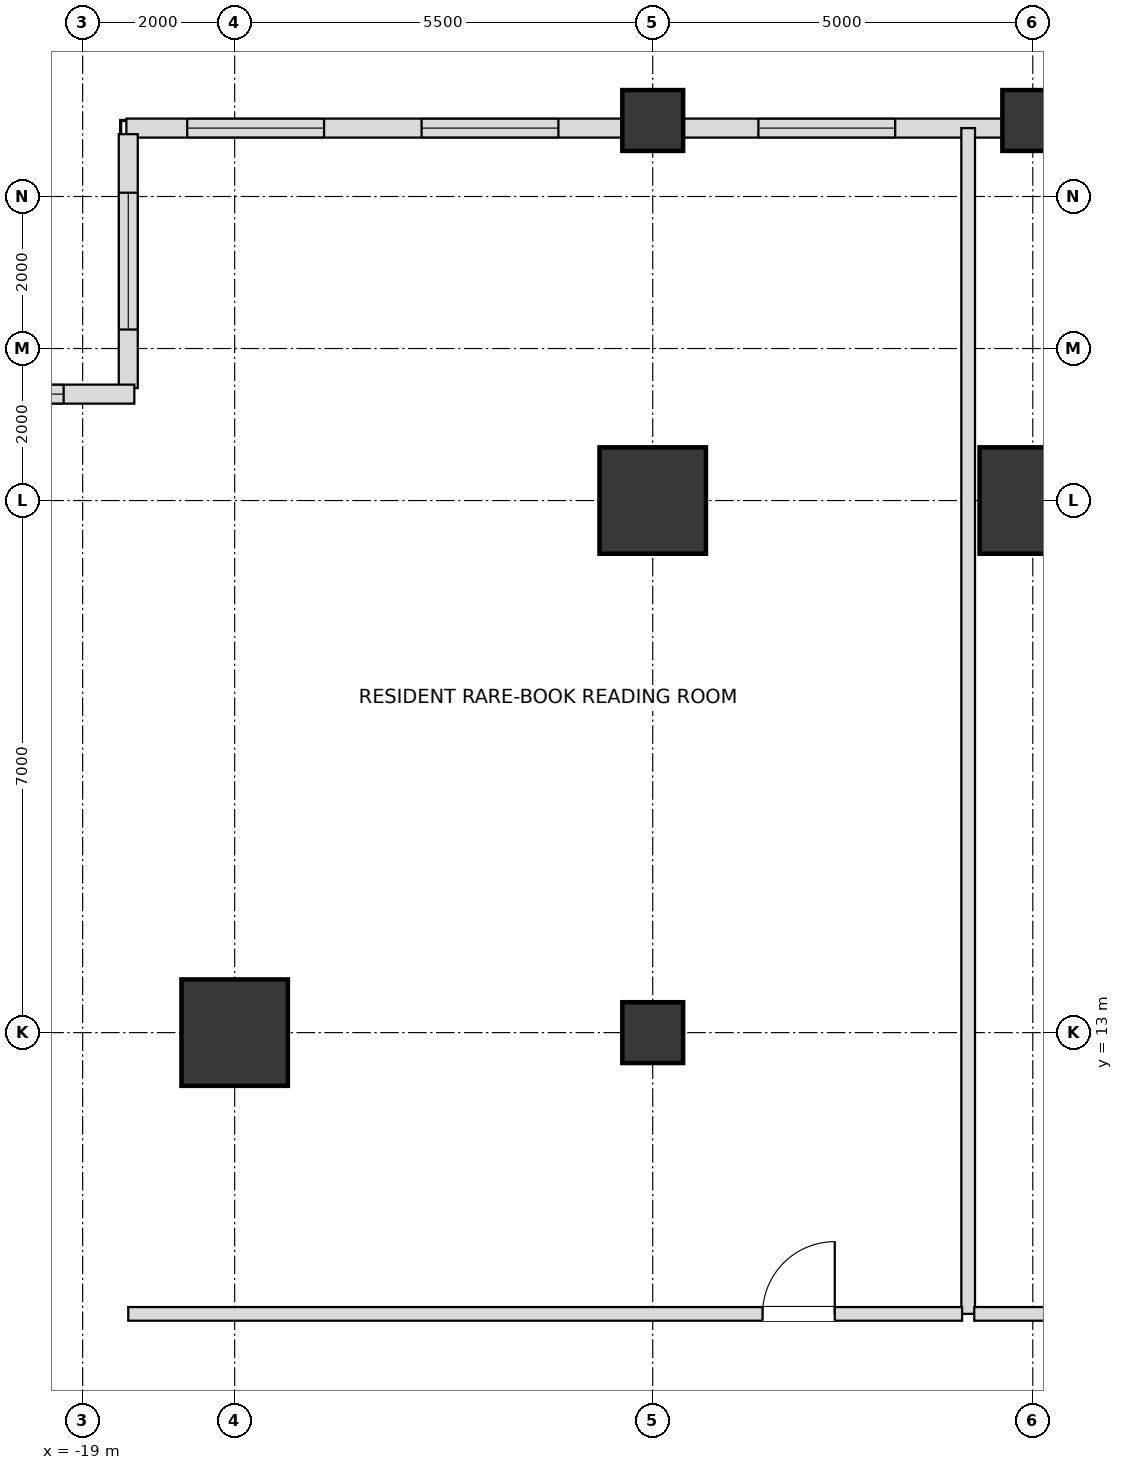
"""IFC4 building model, lengths in metres.
Left out: names, types, materials, properties, quantities, classifications, styles, units other than length and angle.
Written with IfcOpenShell. Run it as: python <this file> out.ifc"""

import sys

from ifc_helpers import new_model, si_unit, direction, frame, frame_2d, origin, origin_2d, place, context, subcontext, project, spatial, rectangle, extrude, element, fill, save


model = new_model("IFC4")
c1 = context("Model", 3, precision=1e-05, world=origin(), true_north=direction((0.0, 1.0)))
c2 = subcontext(c1, "Body", "Model", "MODEL_VIEW")
j1 = project(units=[si_unit("LENGTHUNIT", "METRE"), si_unit("PLANEANGLEUNIT", "RADIAN")], contexts=[c1])
p1 = place(None, origin())
s1 = spatial("IfcSite", under=j1, at=p1, CompositionType="ELEMENT")
p2 = place(p1, origin())
s2 = spatial("IfcBuilding", under=s1, at=p2, CompositionType="ELEMENT")
p3 = place(p2, frame((0.0, 0.0, 68.4)))
s3 = spatial("IfcBuildingStorey", under=s2, at=p3, CompositionType="ELEMENT", Elevation=68.4)
for number, where, z_axis, x_axis in (
    (1, (-6.5, 20.0, 0.0), (0.0, 0.0, 1.0), (1.0, 0.0, 0.0)),
    (2, (-11.5, 20.0, 0.0), (0.0, 0.0, 1.0), (1.0, 0.0, 0.0)),
    (3, (-17.0, 13.0, 0.0), (0.0, 0.0, 1.0), (1.0, 0.0, 0.0)),
):
    element("IfcColumn", number, at=place(p3, frame(where, z_axis=z_axis, x_axis=x_axis)), inside=s3, PredefinedType="USERDEFINED", context=c2, shape_type="SweptSolid", body=[
        extrude(rectangle(XDim=1.4, YDim=1.4, at=origin_2d()), origin(), (0.0, 0.0, 1.0), 3.6),
    ])
for number, where, z_axis, x_axis in (
    (4, (-11.5, 13.0, 0.0), (0.0, 0.0, 1.0), (1.0, 0.0, 0.0)),
    (5, (-11.5, 25.0, 0.0), (0.0, 0.0, 1.0), (1.0, 0.0, 0.0)),
    (6, (-6.5, 25.0, 0.0), (0.0, 0.0, 1.0), (1.0, 0.0, 0.0)),
):
    element("IfcColumn", number, at=place(p3, frame(where, z_axis=z_axis, x_axis=x_axis)), inside=s3, PredefinedType="COLUMN", context=c2, shape_type="SweptSolid", body=[
        extrude(rectangle(XDim=0.8, YDim=0.8, at=origin_2d()), origin(), (0.0, 0.0, 1.0), 3.6),
    ])
p4 = place(p3, frame((-6.895, 24.9, 0.0), z_axis=(0.0, 0.0, 1.0), x_axis=(-1.0, 0.0, 0.0)))
e7 = element("IfcWall", 7, at=p4, inside=s3, PredefinedType="SOLIDWALL", context=c2, shape_type="SweptSolid", body=[
    extrude(rectangle(XDim=4.21, YDim=0.25, at=frame_2d((2.105, 0.0))), origin(), (0.0, 0.0, 1.0), 2.736),
])
p5 = place(p4, frame((1.415, 0.0, 0.72)))
e8 = element("IfcOpeningElement", 8, at=p5, cuts=e7, PredefinedType="OPENING", context=c2, shape_type="SweptSolid", body=[
    extrude(rectangle(XDim=1.8, YDim=1.68, at=frame_2d((0.9, 0.84))), frame((0.0, 0.135, 0.0), z_axis=(0.0, -1.0, 0.0), x_axis=(1.0, 0.0, 0.0)), (0.0, 0.0, 1.0), 0.27),
])
p6 = place(p3, frame((-11.895, 24.9, 0.0), z_axis=(0.0, 0.0, 1.0), x_axis=(-1.0, 0.0, 0.0)))
e9 = element("IfcWall", 9, at=p6, inside=s3, PredefinedType="SOLIDWALL", context=c2, shape_type="SweptSolid", body=[
    extrude(rectangle(XDim=6.53, YDim=0.25, at=frame_2d((3.265, 0.0))), origin(), (0.0, 0.0, 1.0), 2.736),
])
p7 = place(p6, frame((0.846, 0.0, 0.72)))
e10 = element("IfcOpeningElement", 10, at=p7, cuts=e9, PredefinedType="OPENING", context=c2, shape_type="SweptSolid", body=[
    extrude(rectangle(XDim=1.8, YDim=1.68, at=frame_2d((0.9, 0.84))), frame((0.0, 0.135, 0.0), z_axis=(0.0, -1.0, 0.0), x_axis=(1.0, 0.0, 0.0)), (0.0, 0.0, 1.0), 0.27),
])
p8 = place(p6, frame((3.929, 0.0, 0.72)))
e11 = element("IfcOpeningElement", 11, at=p8, cuts=e9, PredefinedType="OPENING", context=c2, shape_type="SweptSolid", body=[
    extrude(rectangle(XDim=1.8, YDim=1.68, at=frame_2d((0.9, 0.84))), frame((0.0, 0.135, 0.0), z_axis=(0.0, -1.0, 0.0), x_axis=(1.0, 0.0, 0.0)), (0.0, 0.0, 1.0), 0.27),
])
p9 = place(p3, frame((-18.4, 24.82, 0.0), z_axis=(0.0, 0.0, 1.0), x_axis=(0.0, -1.0, 0.0)))
e12 = element("IfcWall", 12, at=p9, inside=s3, PredefinedType="SOLIDWALL", context=c2, shape_type="SweptSolid", body=[
    extrude(rectangle(XDim=3.34, YDim=0.25, at=frame_2d((1.67, 0.0))), origin(), (0.0, 0.0, 1.0), 2.736),
])
p10 = place(p9, frame((0.77, 0.0, 0.72)))
e13 = element("IfcOpeningElement", 13, at=p10, cuts=e12, PredefinedType="OPENING", context=c2, shape_type="SweptSolid", body=[
    extrude(rectangle(XDim=1.8, YDim=1.68, at=frame_2d((0.9, 0.84))), frame((0.0, 0.135, 0.0), z_axis=(0.0, -1.0, 0.0), x_axis=(1.0, 0.0, 0.0)), (0.0, 0.0, 1.0), 0.27),
])
p11 = place(p3, frame((-18.32, 21.4, 0.0), z_axis=(0.0, 0.0, 1.0), x_axis=(-1.0, 0.0, 0.0)))
e14 = element("IfcWall", 14, at=p11, inside=s3, PredefinedType="SOLIDWALL", context=c2, shape_type="SweptSolid", body=[
    extrude(rectangle(XDim=3.66, YDim=0.25, at=frame_2d((1.83, 0.0))), origin(), (0.0, 0.0, 1.0), 2.736),
])
p12 = place(p11, frame((0.93, 0.0, 0.72)))
e15 = element("IfcOpeningElement", 15, at=p12, cuts=e14, PredefinedType="OPENING", context=c2, shape_type="SweptSolid", body=[
    extrude(rectangle(XDim=1.8, YDim=1.68, at=frame_2d((0.9, 0.84))), frame((0.0, 0.135, 0.0), z_axis=(0.0, -1.0, 0.0), x_axis=(1.0, 0.0, 0.0)), (0.0, 0.0, 1.0), 0.27),
])
p13 = place(p3, frame((-7.35, 9.3, 0.0), z_axis=(0.0, 0.0, 1.0), x_axis=(0.0, 1.0, 0.0)))
e16 = element("IfcWall", 16, at=p13, inside=s3, PredefinedType="PARTITIONING", context=c2, shape_type="SweptSolid", body=[
    extrude(rectangle(XDim=15.6, YDim=0.18, at=frame_2d((7.8, 0.0))), origin(), (0.0, 0.0, 1.0), 2.816),
])
p14 = place(p3, frame((-18.4, 9.3, 0.0), z_axis=(0.0, 0.0, 1.0), x_axis=(1.0, 0.0, 0.0)))
e17 = element("IfcWall", 17, at=p14, inside=s3, PredefinedType="PARTITIONING", context=c2, shape_type="SweptSolid", body=[
    extrude(rectangle(XDim=10.97, YDim=0.18, at=frame_2d((5.485, 0.0))), origin(), (0.0, 0.0, 1.0), 2.816),
])
p15 = place(p14, frame((8.345, 0.0, 0.0)))
e18 = element("IfcOpeningElement", 18, at=p15, cuts=e17, PredefinedType="OPENING", context=c2, shape_type="SweptSolid", body=[
    extrude(rectangle(XDim=0.95, YDim=2.15, at=frame_2d((0.475, 1.075))), frame((0.0, 0.1, 0.0), z_axis=(0.0, -1.0, 0.0), x_axis=(1.0, 0.0, 0.0)), (0.0, 0.0, 1.0), 0.2),
])
p16 = place(p3, frame((-7.27, 9.3, 0.0), z_axis=(0.0, 0.0, 1.0), x_axis=(1.0, 0.0, 0.0)))
e19 = element("IfcWall", 19, at=p16, inside=s3, PredefinedType="PARTITIONING", context=c2, shape_type="SweptSolid", body=[
    extrude(rectangle(XDim=17.19, YDim=0.18, at=frame_2d((8.595, 0.0))), origin(), (0.0, 0.0, 1.0), 2.816),
])
p17 = place(p16, frame((8.115, 0.0, 0.0)))
e20 = element("IfcOpeningElement", 20, at=p17, cuts=e19, PredefinedType="OPENING", context=c2, shape_type="SweptSolid", body=[
    extrude(rectangle(XDim=0.95, YDim=2.15, at=frame_2d((0.475, 1.075))), frame((0.0, 0.1, 0.0), z_axis=(0.0, -1.0, 0.0), x_axis=(1.0, 0.0, 0.0)), (0.0, 0.0, 1.0), 0.2),
])
p18 = place(p5, origin())
e21 = element("IfcWindow", 21, at=p18, inside=s3, PartitioningType="SINGLE_PANEL", PredefinedType="WINDOW", context=c2, shape_type="SweptSolid", body=[
    extrude(rectangle(XDim=1.8, YDim=1.68, at=frame_2d((0.9, 0.84))), frame((0.0, 0.03, 0.0), z_axis=(0.0, -1.0, 0.0), x_axis=(1.0, 0.0, 0.0)), (0.0, 0.0, 1.0), 0.06),
])
fill(e8, e21)
p19 = place(p7, origin())
e22 = element("IfcWindow", 22, at=p19, inside=s3, PartitioningType="SINGLE_PANEL", PredefinedType="WINDOW", context=c2, shape_type="SweptSolid", body=[
    extrude(rectangle(XDim=1.8, YDim=1.68, at=frame_2d((0.9, 0.84))), frame((0.0, 0.03, 0.0), z_axis=(0.0, -1.0, 0.0), x_axis=(1.0, 0.0, 0.0)), (0.0, 0.0, 1.0), 0.06),
])
fill(e10, e22)
p20 = place(p8, origin())
e23 = element("IfcWindow", 23, at=p20, inside=s3, PartitioningType="SINGLE_PANEL", PredefinedType="WINDOW", context=c2, shape_type="SweptSolid", body=[
    extrude(rectangle(XDim=1.8, YDim=1.68, at=frame_2d((0.9, 0.84))), frame((0.0, 0.03, 0.0), z_axis=(0.0, -1.0, 0.0), x_axis=(1.0, 0.0, 0.0)), (0.0, 0.0, 1.0), 0.06),
])
fill(e11, e23)
p21 = place(p10, origin())
e24 = element("IfcWindow", 24, at=p21, inside=s3, PartitioningType="SINGLE_PANEL", PredefinedType="WINDOW", context=c2, shape_type="SweptSolid", body=[
    extrude(rectangle(XDim=1.8, YDim=1.68, at=frame_2d((0.9, 0.84))), frame((0.0, 0.03, 0.0), z_axis=(0.0, -1.0, 0.0), x_axis=(1.0, 0.0, 0.0)), (0.0, 0.0, 1.0), 0.06),
])
fill(e13, e24)
p22 = place(p12, origin())
e25 = element("IfcWindow", 25, at=p22, inside=s3, PartitioningType="SINGLE_PANEL", PredefinedType="WINDOW", context=c2, shape_type="SweptSolid", body=[
    extrude(rectangle(XDim=1.8, YDim=1.68, at=frame_2d((0.9, 0.84))), frame((0.0, 0.03, 0.0), z_axis=(0.0, -1.0, 0.0), x_axis=(1.0, 0.0, 0.0)), (0.0, 0.0, 1.0), 0.06),
])
fill(e15, e25)
p23 = place(p15, origin())
e26 = element("IfcDoor", 26, at=p23, inside=s3, OperationType="SINGLE_SWING_RIGHT", PredefinedType="DOOR", context=c2, shape_type="SweptSolid", body=[
    extrude(rectangle(XDim=0.95, YDim=2.15, at=frame_2d((0.475, 1.075))), frame((0.0, 0.025, 0.0), z_axis=(0.0, -1.0, 0.0), x_axis=(1.0, 0.0, 0.0)), (0.0, 0.0, 1.0), 0.05),
])
fill(e18, e26)
save(model, sys.argv[1])
